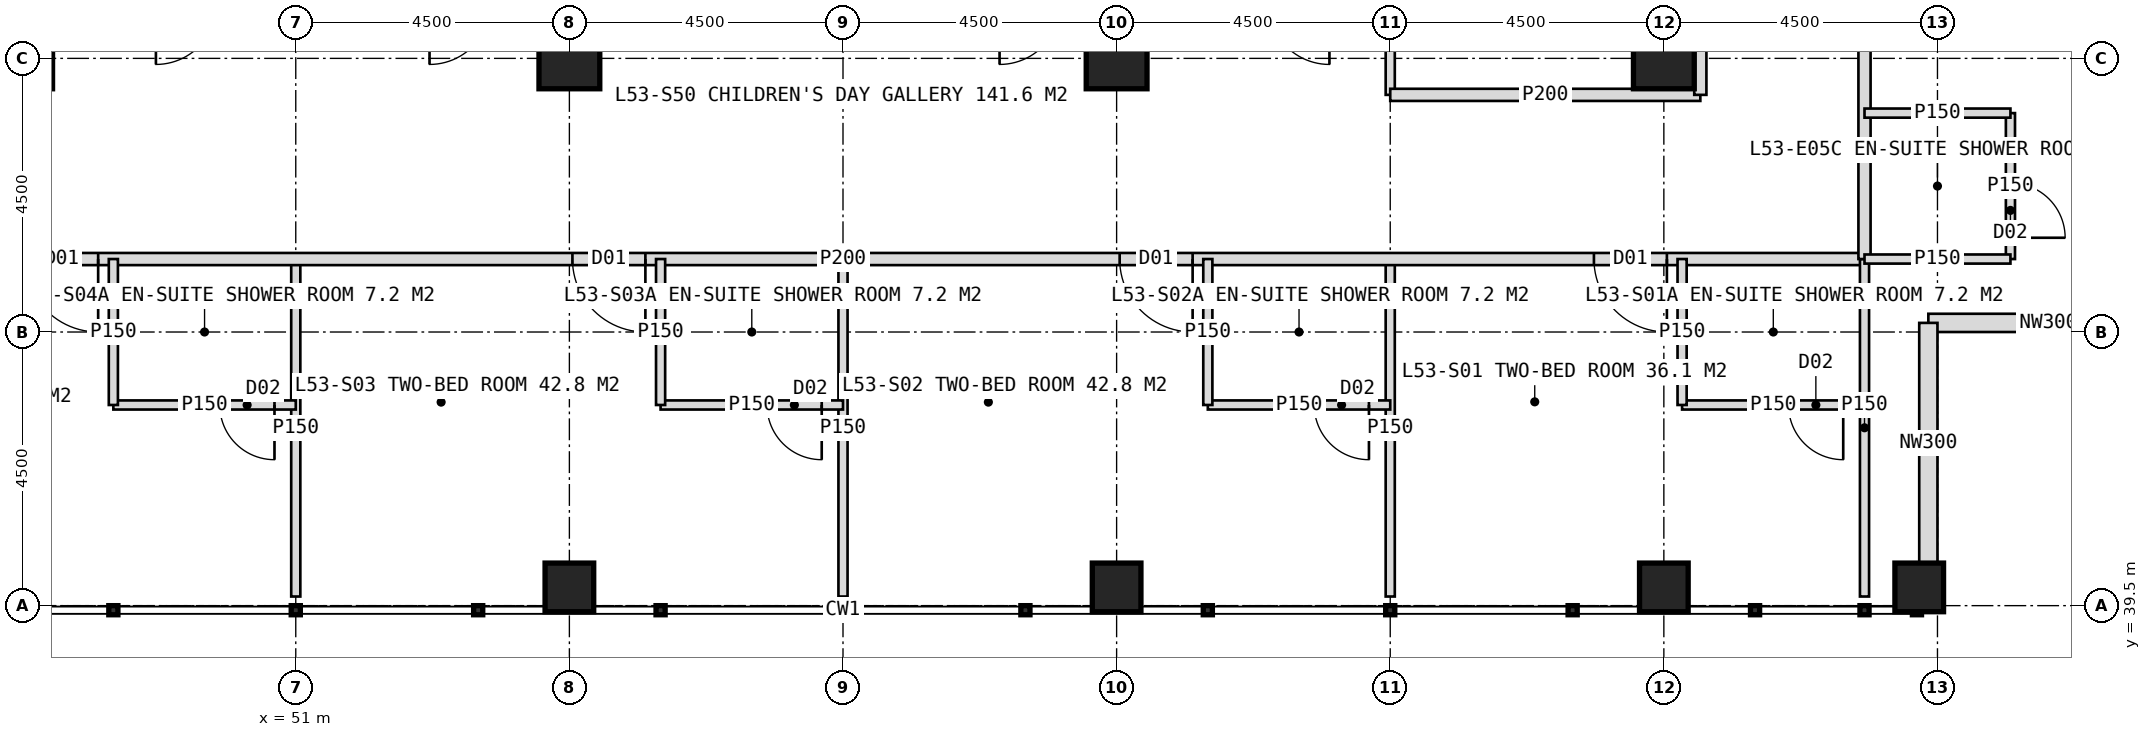
"""IFC4 building model, lengths in metres.
Left out: names, types, materials, properties, quantities, classifications, styles, units other than length and angle.
Written with IfcOpenShell. Run it as: python <this file> out.ifc"""

import sys

from ifc_helpers import new_model, si_unit, direction, frame, frame_2d, origin, origin_2d, place, context, subcontext, project, spatial, rectangle, hollow_rectangle, extrude, element, fill, save


model = new_model("IFC4")
c1 = context("Model", 3, precision=1e-05, world=origin(), true_north=direction((0.0, 1.0)))
c2 = subcontext(c1, "Body", "Model", "MODEL_VIEW")
j1 = project(units=[si_unit("LENGTHUNIT", "METRE"), si_unit("PLANEANGLEUNIT", "RADIAN")], contexts=[c1])
p1 = place(None, origin())
s1 = spatial("IfcSite", under=j1, at=p1, CompositionType="ELEMENT")
p2 = place(p1, origin())
s2 = spatial("IfcBuilding", under=s1, at=p2, CompositionType="ELEMENT")
p3 = place(p2, frame((0.0, 0.0, 221.0)))
s3 = spatial("IfcBuildingStorey", under=s2, at=p3, CompositionType="ELEMENT", Elevation=221.0)
for number, where, z_axis, x_axis in (
    (1, (73.5, 48.5, 0.0), (0.0, 0.0, 1.0), (1.0, 0.0, 0.0)),
    (2, (55.5, 48.5, 0.0), (0.0, 0.0, 1.0), (1.0, 0.0, 0.0)),
    (3, (64.5, 48.5, 0.0), (0.0, 0.0, 1.0), (1.0, 0.0, 0.0)),
):
    element("IfcColumn", number, at=place(p3, frame(where, z_axis=z_axis, x_axis=x_axis)), inside=s3, PredefinedType="COLUMN", context=c2, shape_type="SweptSolid", body=[
        extrude(hollow_rectangle(XDim=1.0, YDim=1.0, WallThickness=0.1, at=origin_2d()), origin(), (0.0, 0.0, 1.0), 4.0),
    ])
for number, where, z_axis, x_axis in (
    (4, (55.5, 39.8, 0.0), (0.0, 0.0, 1.0), (1.0, 0.0, 0.0)),
    (5, (64.5, 39.8, 0.0), (0.0, 0.0, 1.0), (1.0, 0.0, 0.0)),
    (6, (73.5, 39.8, 0.0), (0.0, 0.0, 1.0), (1.0, 0.0, 0.0)),
    (7, (77.7, 39.8, 0.0), (0.0, 0.0, 1.0), (1.0, 0.0, 0.0)),
):
    element("IfcColumn", number, at=place(p3, frame(where, z_axis=z_axis, x_axis=x_axis)), inside=s3, PredefinedType="COLUMN", context=c2, shape_type="SweptSolid", body=[
        extrude(hollow_rectangle(XDim=0.8, YDim=0.8, WallThickness=0.08, at=origin_2d()), origin(), (0.0, 0.0, 1.0), 4.0),
    ])
for number, where, z_axis, x_axis in (
    (8, (81.8, 44.15, 0.0), (0.0, 0.0, 1.0), (-1.0, 0.0, 0.0)),
    (9, (77.85, 44.15, 0.0), (0.0, 0.0, 1.0), (0.0, -1.0, 0.0)),
):
    element("IfcWall", number, at=place(p3, frame(where, z_axis=z_axis, x_axis=x_axis)), inside=s3, PredefinedType="ELEMENTEDWALL", context=c2, shape_type="SweptSolid", body=[
        extrude(rectangle(XDim=3.95, YDim=0.3, at=frame_2d((1.975, 0.0))), origin(), (0.0, 0.0, 1.0), 2.85),
    ])
p4 = place(p3, frame((69.0, 45.2, 0.0), z_axis=(0.0, 0.0, 1.0), x_axis=(0.0, -1.0, 0.0)))
e10 = element("IfcWall", 10, at=p4, inside=s3, PredefinedType="PARTITIONING", context=c2, shape_type="SweptSolid", body=[
    extrude(rectangle(XDim=5.55, YDim=0.15, at=frame_2d((2.775, 0.0))), origin(), (0.0, 0.0, 1.0), 3.75),
])
p5 = place(p3, frame((60.0, 45.2, 0.0), z_axis=(0.0, 0.0, 1.0), x_axis=(0.0, -1.0, 0.0)))
e11 = element("IfcWall", 11, at=p5, inside=s3, PredefinedType="PARTITIONING", context=c2, shape_type="SweptSolid", body=[
    extrude(rectangle(XDim=5.55, YDim=0.15, at=frame_2d((2.775, 0.0))), origin(), (0.0, 0.0, 1.0), 2.95),
])
p6 = place(p3, frame((51.0, 45.2, 0.0), z_axis=(0.0, 0.0, 1.0), x_axis=(0.0, -1.0, 0.0)))
e12 = element("IfcWall", 12, at=p6, inside=s3, PredefinedType="PARTITIONING", context=c2, shape_type="SweptSolid", body=[
    extrude(rectangle(XDim=5.55, YDim=0.15, at=frame_2d((2.775, 0.0))), origin(), (0.0, 0.0, 1.0), 3.75),
])
p7 = place(p3, frame((76.8, 45.2, 0.0), z_axis=(0.0, 0.0, 1.0), x_axis=(-1.0, 0.0, 0.0)))
e13 = element("IfcWall", 13, at=p7, inside=s3, PredefinedType="PARTITIONING", context=c2, shape_type="SweptSolid", body=[
    extrude(rectangle(XDim=33.6, YDim=0.2, at=frame_2d((16.8, 0.0))), origin(), (0.0, 0.0, 1.0), 3.75),
])
p8 = place(p7, frame((3.25, 0.0, 0.0)))
e14 = element("IfcOpeningElement", 14, at=p8, cuts=e13, PredefinedType="OPENING", context=c2, shape_type="SweptSolid", body=[
    extrude(rectangle(XDim=1.2, YDim=2.2, at=frame_2d((0.6, 1.1))), frame((0.0, 0.11, 0.0), z_axis=(0.0, -1.0, 0.0), x_axis=(1.0, 0.0, 0.0)), (0.0, 0.0, 1.0), 0.22),
])
p9 = place(p7, frame((11.05, 0.0, 0.0)))
e15 = element("IfcOpeningElement", 15, at=p9, cuts=e13, PredefinedType="OPENING", context=c2, shape_type="SweptSolid", body=[
    extrude(rectangle(XDim=1.2, YDim=2.2, at=frame_2d((0.6, 1.1))), frame((0.0, 0.11, 0.0), z_axis=(0.0, -1.0, 0.0), x_axis=(1.0, 0.0, 0.0)), (0.0, 0.0, 1.0), 0.22),
])
p10 = place(p7, frame((20.05, 0.0, 0.0)))
e16 = element("IfcOpeningElement", 16, at=p10, cuts=e13, PredefinedType="OPENING", context=c2, shape_type="SweptSolid", body=[
    extrude(rectangle(XDim=1.2, YDim=2.2, at=frame_2d((0.6, 1.1))), frame((0.0, 0.11, 0.0), z_axis=(0.0, -1.0, 0.0), x_axis=(1.0, 0.0, 0.0)), (0.0, 0.0, 1.0), 0.22),
])
p11 = place(p7, frame((29.05, 0.0, 0.0)))
e17 = element("IfcOpeningElement", 17, at=p11, cuts=e13, PredefinedType="OPENING", context=c2, shape_type="SweptSolid", body=[
    extrude(rectangle(XDim=1.2, YDim=2.2, at=frame_2d((0.6, 1.1))), frame((0.0, 0.11, 0.0), z_axis=(0.0, -1.0, 0.0), x_axis=(1.0, 0.0, 0.0)), (0.0, 0.0, 1.0), 0.22),
])
p12 = place(p3, frame((76.8, 45.2, 0.0), z_axis=(0.0, 0.0, 1.0), x_axis=(0.0, -1.0, 0.0)))
e18 = element("IfcWall", 18, at=p12, inside=s3, PredefinedType="PARTITIONING", context=c2, shape_type="SweptSolid", body=[
    extrude(rectangle(XDim=5.55, YDim=0.15, at=frame_2d((2.775, 0.0))), origin(), (0.0, 0.0, 1.0), 3.75),
])
p13 = place(p3, frame((76.8, 42.8, 0.0), z_axis=(0.0, 0.0, 1.0), x_axis=(-1.0, 0.0, 0.0)))
e19 = element("IfcWall", 19, at=p13, inside=s3, PredefinedType="PARTITIONING", context=c2, shape_type="SweptSolid", body=[
    extrude(rectangle(XDim=3.0, YDim=0.15, at=frame_2d((1.5, 0.0))), origin(), (0.0, 0.0, 1.0), 3.75),
])
p14 = place(p13, frame((0.35, 0.0, 0.0)))
e20 = element("IfcOpeningElement", 20, at=p14, cuts=e19, PredefinedType="OPENING", context=c2, shape_type="SweptSolid", body=[
    extrude(rectangle(XDim=0.9, YDim=2.1, at=frame_2d((0.45, 1.05))), frame((0.0, 0.085, 0.0), z_axis=(0.0, -1.0, 0.0), x_axis=(1.0, 0.0, 0.0)), (0.0, 0.0, 1.0), 0.17),
])
p15 = place(p3, frame((73.8, 45.2, 0.0), z_axis=(0.0, 0.0, 1.0), x_axis=(0.0, -1.0, 0.0)))
e21 = element("IfcWall", 21, at=p15, inside=s3, PredefinedType="PARTITIONING", context=c2, shape_type="SweptSolid", body=[
    extrude(rectangle(XDim=2.4, YDim=0.15, at=frame_2d((1.2, 0.0))), origin(), (0.0, 0.0, 1.0), 3.75),
])
p16 = place(p3, frame((69.0, 42.8, 0.0), z_axis=(0.0, 0.0, 1.0), x_axis=(-1.0, 0.0, 0.0)))
e22 = element("IfcWall", 22, at=p16, inside=s3, PredefinedType="PARTITIONING", context=c2, shape_type="SweptSolid", body=[
    extrude(rectangle(XDim=3.0, YDim=0.15, at=frame_2d((1.5, 0.0))), origin(), (0.0, 0.0, 1.0), 3.75),
])
p17 = place(p16, frame((0.35, 0.0, 0.0)))
e23 = element("IfcOpeningElement", 23, at=p17, cuts=e22, PredefinedType="OPENING", context=c2, shape_type="SweptSolid", body=[
    extrude(rectangle(XDim=0.9, YDim=2.1, at=frame_2d((0.45, 1.05))), frame((0.0, 0.085, 0.0), z_axis=(0.0, -1.0, 0.0), x_axis=(1.0, 0.0, 0.0)), (0.0, 0.0, 1.0), 0.17),
])
p18 = place(p3, frame((66.0, 45.2, 0.0), z_axis=(0.0, 0.0, 1.0), x_axis=(0.0, -1.0, 0.0)))
e24 = element("IfcWall", 24, at=p18, inside=s3, PredefinedType="PARTITIONING", context=c2, shape_type="SweptSolid", body=[
    extrude(rectangle(XDim=2.4, YDim=0.15, at=frame_2d((1.2, 0.0))), origin(), (0.0, 0.0, 1.0), 3.75),
])
p19 = place(p3, frame((60.0, 42.8, 0.0), z_axis=(0.0, 0.0, 1.0), x_axis=(-1.0, 0.0, 0.0)))
e25 = element("IfcWall", 25, at=p19, inside=s3, PredefinedType="PARTITIONING", context=c2, shape_type="SweptSolid", body=[
    extrude(rectangle(XDim=3.0, YDim=0.15, at=frame_2d((1.5, 0.0))), origin(), (0.0, 0.0, 1.0), 3.75),
])
p20 = place(p19, frame((0.35, 0.0, 0.0)))
e26 = element("IfcOpeningElement", 26, at=p20, cuts=e25, PredefinedType="OPENING", context=c2, shape_type="SweptSolid", body=[
    extrude(rectangle(XDim=0.9, YDim=2.1, at=frame_2d((0.45, 1.05))), frame((0.0, 0.085, 0.0), z_axis=(0.0, -1.0, 0.0), x_axis=(1.0, 0.0, 0.0)), (0.0, 0.0, 1.0), 0.17),
])
p21 = place(p3, frame((57.0, 45.2, 0.0), z_axis=(0.0, 0.0, 1.0), x_axis=(0.0, -1.0, 0.0)))
e27 = element("IfcWall", 27, at=p21, inside=s3, PredefinedType="PARTITIONING", context=c2, shape_type="SweptSolid", body=[
    extrude(rectangle(XDim=2.4, YDim=0.15, at=frame_2d((1.2, 0.0))), origin(), (0.0, 0.0, 1.0), 3.75),
])
p22 = place(p3, frame((51.0, 42.8, 0.0), z_axis=(0.0, 0.0, 1.0), x_axis=(-1.0, 0.0, 0.0)))
e28 = element("IfcWall", 28, at=p22, inside=s3, PredefinedType="PARTITIONING", context=c2, shape_type="SweptSolid", body=[
    extrude(rectangle(XDim=3.0, YDim=0.15, at=frame_2d((1.5, 0.0))), origin(), (0.0, 0.0, 1.0), 3.75),
])
p23 = place(p22, frame((0.35, 0.0, 0.0)))
e29 = element("IfcOpeningElement", 29, at=p23, cuts=e28, PredefinedType="OPENING", context=c2, shape_type="SweptSolid", body=[
    extrude(rectangle(XDim=0.9, YDim=2.1, at=frame_2d((0.45, 1.05))), frame((0.0, 0.085, 0.0), z_axis=(0.0, -1.0, 0.0), x_axis=(1.0, 0.0, 0.0)), (0.0, 0.0, 1.0), 0.17),
])
p24 = place(p3, frame((48.0, 45.2, 0.0), z_axis=(0.0, 0.0, 1.0), x_axis=(0.0, -1.0, 0.0)))
e30 = element("IfcWall", 30, at=p24, inside=s3, PredefinedType="PARTITIONING", context=c2, shape_type="SweptSolid", body=[
    extrude(rectangle(XDim=2.4, YDim=0.15, at=frame_2d((1.2, 0.0))), origin(), (0.0, 0.0, 1.0), 3.75),
])
p25 = place(p3, frame((69.0, 53.0, 0.0), z_axis=(0.0, 0.0, 1.0), x_axis=(0.0, -1.0, 0.0)))
e31 = element("IfcWall", 31, at=p25, inside=s3, PredefinedType="PARTITIONING", context=c2, shape_type="SweptSolid", body=[
    extrude(rectangle(XDim=5.1, YDim=0.15, at=frame_2d((2.55, 0.0))), origin(), (0.0, 0.0, 1.0), 3.75),
])
p26 = place(p3, frame((74.1, 47.9, 0.0), z_axis=(0.0, 0.0, 1.0), x_axis=(-1.0, 0.0, 0.0)))
e32 = element("IfcWall", 32, at=p26, inside=s3, PredefinedType="PARTITIONING", context=c2, shape_type="SweptSolid", body=[
    extrude(rectangle(XDim=5.1, YDim=0.2, at=frame_2d((2.55, 0.0))), origin(), (0.0, 0.0, 1.0), 3.75),
])
p27 = place(p3, frame((76.8, 78.8, 0.0), z_axis=(0.0, 0.0, 1.0), x_axis=(0.0, -1.0, 0.0)))
e33 = element("IfcWall", 33, at=p27, inside=s3, PredefinedType="PARTITIONING", context=c2, shape_type="SweptSolid", body=[
    extrude(rectangle(XDim=33.6, YDim=0.2, at=frame_2d((16.8, 0.0))), origin(), (0.0, 0.0, 1.0), 3.75),
])
p28 = place(p27, frame((3.25, 0.0, 0.0)))
e34 = element("IfcOpeningElement", 34, at=p28, cuts=e33, PredefinedType="OPENING", context=c2, shape_type="SweptSolid", body=[
    extrude(rectangle(XDim=1.2, YDim=2.2, at=frame_2d((0.6, 1.1))), frame((0.0, 0.11, 0.0), z_axis=(0.0, -1.0, 0.0), x_axis=(1.0, 0.0, 0.0)), (0.0, 0.0, 1.0), 0.22),
])
p29 = place(p27, frame((10.45, 0.0, 0.0)))
e35 = element("IfcOpeningElement", 35, at=p29, cuts=e33, PredefinedType="OPENING", context=c2, shape_type="SweptSolid", body=[
    extrude(rectangle(XDim=1.2, YDim=2.2, at=frame_2d((0.6, 1.1))), frame((0.0, 0.11, 0.0), z_axis=(0.0, -1.0, 0.0), x_axis=(1.0, 0.0, 0.0)), (0.0, 0.0, 1.0), 0.22),
])
p30 = place(p27, frame((14.8, 0.0, 0.0)))
e36 = element("IfcOpeningElement", 36, at=p30, cuts=e33, PredefinedType="OPENING", context=c2, shape_type="SweptSolid", body=[
    extrude(rectangle(XDim=1.0, YDim=2.1, at=frame_2d((0.5, 1.05))), frame((0.0, 0.11, 0.0), z_axis=(0.0, -1.0, 0.0), x_axis=(1.0, 0.0, 0.0)), (0.0, 0.0, 1.0), 0.22),
])
p31 = place(p27, frame((20.05, 0.0, 0.0)))
e37 = element("IfcOpeningElement", 37, at=p31, cuts=e33, PredefinedType="OPENING", context=c2, shape_type="SweptSolid", body=[
    extrude(rectangle(XDim=1.2, YDim=2.2, at=frame_2d((0.6, 1.1))), frame((0.0, 0.11, 0.0), z_axis=(0.0, -1.0, 0.0), x_axis=(1.0, 0.0, 0.0)), (0.0, 0.0, 1.0), 0.22),
])
p32 = place(p27, frame((26.95, 0.0, 0.0)))
e38 = element("IfcOpeningElement", 38, at=p32, cuts=e33, PredefinedType="OPENING", context=c2, shape_type="SweptSolid", body=[
    extrude(rectangle(XDim=1.2, YDim=2.2, at=frame_2d((0.6, 1.1))), frame((0.0, 0.11, 0.0), z_axis=(0.0, -1.0, 0.0), x_axis=(1.0, 0.0, 0.0)), (0.0, 0.0, 1.0), 0.22),
])
p33 = place(p3, frame((79.2, 47.6, 0.0), z_axis=(0.0, 0.0, 1.0), x_axis=(0.0, -1.0, 0.0)))
e39 = element("IfcWall", 39, at=p33, inside=s3, PredefinedType="PARTITIONING", context=c2, shape_type="SweptSolid", body=[
    extrude(rectangle(XDim=2.4, YDim=0.15, at=frame_2d((1.2, 0.0))), origin(), (0.0, 0.0, 1.0), 3.75),
])
p34 = place(p33, frame((1.15, 0.0, 0.0)))
e40 = element("IfcOpeningElement", 40, at=p34, cuts=e39, PredefinedType="OPENING", context=c2, shape_type="SweptSolid", body=[
    extrude(rectangle(XDim=0.9, YDim=2.1, at=frame_2d((0.45, 1.05))), frame((0.0, 0.085, 0.0), z_axis=(0.0, -1.0, 0.0), x_axis=(1.0, 0.0, 0.0)), (0.0, 0.0, 1.0), 0.17),
])
for number, where, z_axis, x_axis in (
    (41, (76.8, 47.6, 0.0), (0.0, 0.0, 1.0), (1.0, 0.0, 0.0)),
    (42, (76.8, 45.2, 0.0), (0.0, 0.0, 1.0), (1.0, 0.0, 0.0)),
):
    element("IfcWall", number, at=place(p3, frame(where, z_axis=z_axis, x_axis=x_axis)), inside=s3, PredefinedType="PARTITIONING", context=c2, shape_type="SweptSolid", body=[
        extrude(rectangle(XDim=2.4, YDim=0.15, at=frame_2d((1.2, 0.0))), origin(), (0.0, 0.0, 1.0), 3.75),
    ])
p35 = place(p3, frame((74.1, 62.0, 0.0), z_axis=(0.0, 0.0, 1.0), x_axis=(0.0, -1.0, 0.0)))
e43 = element("IfcWall", 43, at=p35, inside=s3, PredefinedType="PARTITIONING", context=c2, shape_type="SweptSolid", body=[
    extrude(rectangle(XDim=14.1, YDim=0.2, at=frame_2d((7.05, 0.0))), origin(), (0.0, 0.0, 1.0), 3.75),
])
p36 = place(p35, frame((1.45, 0.0, 0.0)))
e44 = element("IfcOpeningElement", 44, at=p36, cuts=e43, PredefinedType="OPENING", context=c2, shape_type="SweptSolid", body=[
    extrude(rectangle(XDim=1.0, YDim=2.1, at=frame_2d((0.5, 1.05))), frame((0.0, 0.11, 0.0), z_axis=(0.0, -1.0, 0.0), x_axis=(1.0, 0.0, 0.0)), (0.0, 0.0, 1.0), 0.22),
])
p37 = place(p35, frame((10.3, 0.0, 0.0)))
e45 = element("IfcOpeningElement", 45, at=p37, cuts=e43, PredefinedType="OPENING", context=c2, shape_type="SweptSolid", body=[
    extrude(rectangle(XDim=1.0, YDim=2.1, at=frame_2d((0.5, 1.05))), frame((0.0, 0.11, 0.0), z_axis=(0.0, -1.0, 0.0), x_axis=(1.0, 0.0, 0.0)), (0.0, 0.0, 1.0), 0.22),
])
p38 = place(p8, origin())
e46 = element("IfcDoor", 46, at=p38, inside=s3, OperationType="SINGLE_SWING_LEFT", PredefinedType="DOOR", context=c2, shape_type="SweptSolid", body=[
    extrude(rectangle(XDim=1.2, YDim=2.2, at=frame_2d((0.6, 1.1))), frame((0.0, 0.025, 0.0), z_axis=(0.0, -1.0, 0.0), x_axis=(1.0, 0.0, 0.0)), (0.0, 0.0, 1.0), 0.05),
])
fill(e14, e46)
p39 = place(p14, origin())
e47 = element("IfcDoor", 47, at=p39, inside=s3, OperationType="SINGLE_SWING_LEFT", PredefinedType="DOOR", context=c2, shape_type="SweptSolid", body=[
    extrude(rectangle(XDim=0.9, YDim=2.1, at=frame_2d((0.45, 1.05))), frame((0.0, 0.025, 0.0), z_axis=(0.0, -1.0, 0.0), x_axis=(1.0, 0.0, 0.0)), (0.0, 0.0, 1.0), 0.05),
])
fill(e20, e47)
p40 = place(p9, origin())
e48 = element("IfcDoor", 48, at=p40, inside=s3, OperationType="SINGLE_SWING_LEFT", PredefinedType="DOOR", context=c2, shape_type="SweptSolid", body=[
    extrude(rectangle(XDim=1.2, YDim=2.2, at=frame_2d((0.6, 1.1))), frame((0.0, 0.025, 0.0), z_axis=(0.0, -1.0, 0.0), x_axis=(1.0, 0.0, 0.0)), (0.0, 0.0, 1.0), 0.05),
])
fill(e15, e48)
p41 = place(p17, origin())
e49 = element("IfcDoor", 49, at=p41, inside=s3, OperationType="SINGLE_SWING_LEFT", PredefinedType="DOOR", context=c2, shape_type="SweptSolid", body=[
    extrude(rectangle(XDim=0.9, YDim=2.1, at=frame_2d((0.45, 1.05))), frame((0.0, 0.025, 0.0), z_axis=(0.0, -1.0, 0.0), x_axis=(1.0, 0.0, 0.0)), (0.0, 0.0, 1.0), 0.05),
])
fill(e23, e49)
p42 = place(p10, origin())
e50 = element("IfcDoor", 50, at=p42, inside=s3, OperationType="SINGLE_SWING_LEFT", PredefinedType="DOOR", context=c2, shape_type="SweptSolid", body=[
    extrude(rectangle(XDim=1.2, YDim=2.2, at=frame_2d((0.6, 1.1))), frame((0.0, 0.025, 0.0), z_axis=(0.0, -1.0, 0.0), x_axis=(1.0, 0.0, 0.0)), (0.0, 0.0, 1.0), 0.05),
])
fill(e16, e50)
p43 = place(p20, origin())
e51 = element("IfcDoor", 51, at=p43, inside=s3, OperationType="SINGLE_SWING_LEFT", PredefinedType="DOOR", context=c2, shape_type="SweptSolid", body=[
    extrude(rectangle(XDim=0.9, YDim=2.1, at=frame_2d((0.45, 1.05))), frame((0.0, 0.025, 0.0), z_axis=(0.0, -1.0, 0.0), x_axis=(1.0, 0.0, 0.0)), (0.0, 0.0, 1.0), 0.05),
])
fill(e26, e51)
p44 = place(p11, origin())
e52 = element("IfcDoor", 52, at=p44, inside=s3, OperationType="SINGLE_SWING_LEFT", PredefinedType="DOOR", context=c2, shape_type="SweptSolid", body=[
    extrude(rectangle(XDim=1.2, YDim=2.2, at=frame_2d((0.6, 1.1))), frame((0.0, 0.025, 0.0), z_axis=(0.0, -1.0, 0.0), x_axis=(1.0, 0.0, 0.0)), (0.0, 0.0, 1.0), 0.05),
])
fill(e17, e52)
p45 = place(p23, origin())
e53 = element("IfcDoor", 53, at=p45, inside=s3, OperationType="SINGLE_SWING_LEFT", PredefinedType="DOOR", context=c2, shape_type="SweptSolid", body=[
    extrude(rectangle(XDim=0.9, YDim=2.1, at=frame_2d((0.45, 1.05))), frame((0.0, 0.025, 0.0), z_axis=(0.0, -1.0, 0.0), x_axis=(1.0, 0.0, 0.0)), (0.0, 0.0, 1.0), 0.05),
])
fill(e29, e53)
p46 = place(p34, origin())
e54 = element("IfcDoor", 54, at=p46, inside=s3, OperationType="SINGLE_SWING_RIGHT", PredefinedType="DOOR", context=c2, shape_type="SweptSolid", body=[
    extrude(rectangle(XDim=0.9, YDim=2.1, at=frame_2d((0.45, 1.05))), frame((0.0, 0.025, 0.0), z_axis=(0.0, -1.0, 0.0), x_axis=(1.0, 0.0, 0.0)), (0.0, 0.0, 1.0), 0.05),
])
fill(e40, e54)
save(model, sys.argv[1])
